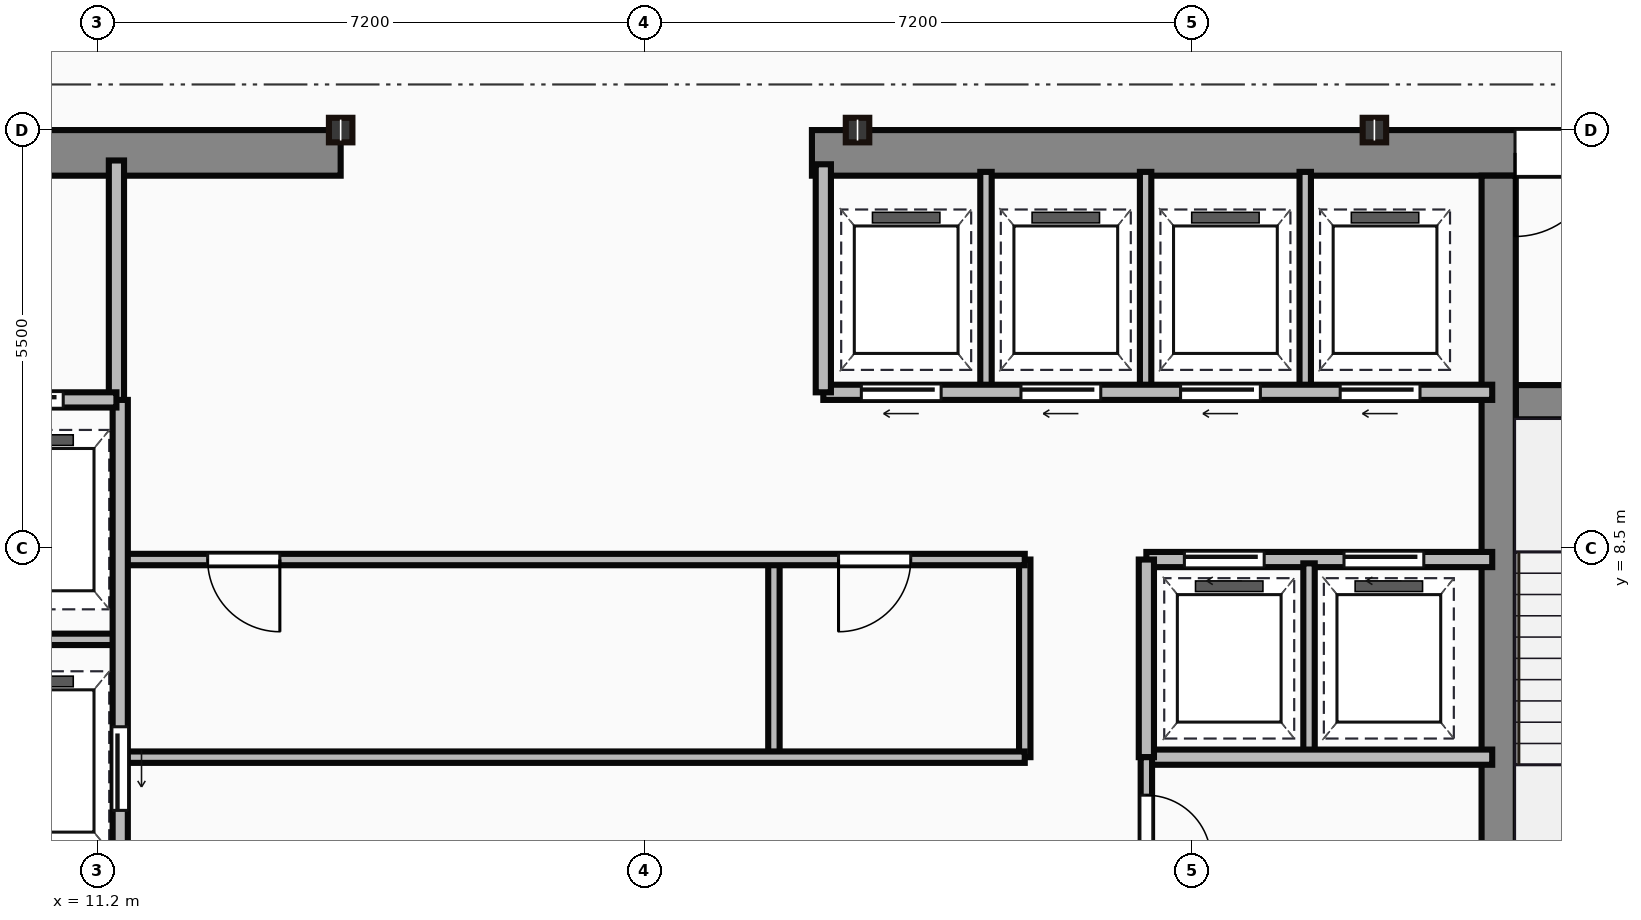
"""IFC4 building model, lengths in metres.
Left out: names, types, materials, properties, quantities, classifications, styles, units other than length and angle.
Written with IfcOpenShell. Run it as: python <this file> out.ifc"""

import sys

from ifc_helpers import new_model, si_unit, direction, frame, frame_2d, origin, origin_2d, place, context, subcontext, project, spatial, rectangle, i_section, extrude, source, transform, mapped, element, fill, save


model = new_model("IFC4")
c1 = context("Model", 3, precision=1e-05, world=origin(), true_north=direction((0.0, 1.0)))
c2 = subcontext(c1, "Body", "Model", "MODEL_VIEW")
j1 = project(units=[si_unit("LENGTHUNIT", "METRE"), si_unit("PLANEANGLEUNIT", "RADIAN")], contexts=[c1])
p1 = place(None, origin())
s1 = spatial("IfcSite", under=j1, at=p1, CompositionType="ELEMENT")
p2 = place(p1, origin())
s2 = spatial("IfcBuilding", under=s1, at=p2, CompositionType="ELEMENT")
p3 = place(p2, frame((0.0, 0.0, 225.1)))
s3 = spatial("IfcBuildingStorey", under=s2, at=p3, CompositionType="ELEMENT", Elevation=225.1)
m1 = source(origin(), c2, "Body", "SweptSolid", [
    extrude(rectangle(XDim=9.1, YDim=0.6, at=frame_2d((4.55, 0.0))), origin(), (0.0, 0.0, 1.0), 3.65),
])
p4 = place(p3, frame((5.3, 13.7, 0.0), z_axis=(0.0, 0.0, 1.0), x_axis=(1.0, 0.0, 0.0)))
e1 = element("IfcWall", 1, at=p4, inside=s3, PredefinedType="SHEAR", context=c2, shape_type="MappedRepresentation", body=[
    mapped(m1, transform((0.0, 0.0, 0.0))),
])
p5 = place(p4, frame((4.1, 0.0, 0.0)))
e2 = element("IfcOpeningElement", 2, at=p5, cuts=e1, PredefinedType="OPENING", context=c2, shape_type="SweptSolid", body=[
    extrude(rectangle(XDim=1.1, YDim=2.15, at=frame_2d((0.55, 1.075))), frame((0.0, 0.31, 0.0), z_axis=(0.0, -1.0, 0.0), x_axis=(1.0, 0.0, 0.0)), (0.0, 0.0, 1.0), 0.62),
])
m2 = source(origin(), c2, "Body", "SweptSolid", [
    extrude(rectangle(XDim=12.6, YDim=0.6, at=frame_2d((6.3, 0.0))), origin(), (0.0, 0.0, 1.0), 3.65),
])
p6 = place(p3, frame((20.6, 13.7, 0.0), z_axis=(0.0, 0.0, 1.0), x_axis=(1.0, 0.0, 0.0)))
e3 = element("IfcWall", 3, at=p6, inside=s3, PredefinedType="SHEAR", context=c2, shape_type="MappedRepresentation", body=[
    mapped(m2, transform((0.0, 0.0, 0.0))),
])
p7 = place(p6, frame((9.25, 0.0, 0.0)))
e4 = element("IfcOpeningElement", 4, at=p7, cuts=e3, PredefinedType="OPENING", context=c2, shape_type="SweptSolid", body=[
    extrude(rectangle(XDim=1.1, YDim=2.15, at=frame_2d((0.55, 1.075))), frame((0.0, 0.31, 0.0), z_axis=(0.0, -1.0, 0.0), x_axis=(1.0, 0.0, 0.0)), (0.0, 0.0, 1.0), 0.62),
])
m3 = source(origin(), c2, "Body", "SweptSolid", [
    extrude(rectangle(XDim=12.5, YDim=0.45, at=frame_2d((6.25, 0.0))), origin(), (0.0, 0.0, 1.0), 3.65),
])
p8 = place(p3, frame((29.635, 0.9, 0.0), z_axis=(0.0, 0.0, 1.0), x_axis=(0.0, 1.0, 0.0)))
e5 = element("IfcWall", 5, at=p8, inside=s3, PredefinedType="SHEAR", context=c2, shape_type="MappedRepresentation", body=[
    mapped(m3, transform((0.0, 0.0, 0.0))),
])
m4 = source(origin(), c2, "Body", "SweptSolid", [
    extrude(rectangle(XDim=3.39, YDim=0.45, at=frame_2d((1.695, 0.0))), origin(), (0.0, 0.0, 1.0), 3.65),
])
p9 = place(p3, frame((29.86, 10.42, 0.0), z_axis=(0.0, 0.0, 1.0), x_axis=(1.0, 0.0, 0.0)))
e6 = element("IfcWall", 6, at=p9, inside=s3, PredefinedType="SHEAR", context=c2, shape_type="MappedRepresentation", body=[
    mapped(m4, transform((0.0, 0.0, 0.0))),
])
p10 = place(p9, frame((1.1, 0.0, 0.0)))
e7 = element("IfcOpeningElement", 7, at=p10, cuts=e6, PredefinedType="OPENING", context=c2, shape_type="SweptSolid", body=[
    extrude(rectangle(XDim=1.1, YDim=2.15, at=frame_2d((0.55, 1.075))), frame((0.0, 0.235, 0.0), z_axis=(0.0, -1.0, 0.0), x_axis=(1.0, 0.0, 0.0)), (0.0, 0.0, 1.0), 0.47),
])
m5 = source(origin(), c2, "Body", "SweptSolid", [
    extrude(i_section(OverallWidth=0.309, OverallDepth=0.323, WebThickness=0.014, FlangeThickness=0.023, at=origin_2d()), origin(), (0.0, 0.0, 1.0), 3.65),
])
for number, where, z_axis, x_axis in (
    (8, (14.4, 14.0, 0.0), (0.0, 0.0, 1.0), (1.0, 0.0, 0.0)),
    (9, (21.2, 14.0, 0.0), (0.0, 0.0, 1.0), (1.0, 0.0, 0.0)),
    (10, (28.0, 14.0, 0.0), (0.0, 0.0, 1.0), (1.0, 0.0, 0.0)),
):
    element("IfcColumn", number, at=place(p3, frame(where, z_axis=z_axis, x_axis=x_axis)), inside=s3, PredefinedType="COLUMN", context=c2, shape_type="MappedRepresentation", body=[
        mapped(m5, transform((0.0, 0.0, 0.0))),
    ])
m6 = source(origin(), c2, "Body", "SweptSolid", [
    extrude(rectangle(XDim=3.18, YDim=0.2, at=frame_2d((1.59, 0.0))), origin(), (0.0, 0.0, 1.0), 3.4),
])
p11 = place(p3, frame((11.45, 10.42, 0.0), z_axis=(0.0, 0.0, 1.0), x_axis=(0.0, 1.0, 0.0)))
e11 = element("IfcWall", 11, at=p11, inside=s3, PredefinedType="PARTITIONING", context=c2, shape_type="MappedRepresentation", body=[
    mapped(m6, transform((0.0, 0.0, 0.0))),
])
m7 = source(origin(), c2, "Body", "SweptSolid", [
    extrude(rectangle(XDim=2.35, YDim=0.2, at=frame_2d((1.175, 0.0))), origin(), (0.0, 0.0, 1.0), 3.4),
])
p12 = place(p3, frame((9.1, 10.45, 0.0), z_axis=(0.0, 0.0, 1.0), x_axis=(1.0, 0.0, 0.0)))
e12 = element("IfcWall", 12, at=p12, inside=s3, PredefinedType="PARTITIONING", context=c2, shape_type="MappedRepresentation", body=[
    mapped(m7, transform((0.0, 0.0, 0.0))),
])
p13 = place(p12, frame((0.55, 0.0, 0.0)))
e13 = element("IfcOpeningElement", 13, at=p13, cuts=e12, PredefinedType="OPENING", context=c2, shape_type="SweptSolid", body=[
    extrude(rectangle(XDim=1.1, YDim=2.15, at=frame_2d((0.55, 1.075))), frame((0.0, 0.11, 0.0), z_axis=(0.0, -1.0, 0.0), x_axis=(1.0, 0.0, 0.0)), (0.0, 0.0, 1.0), 0.22),
])
m8 = source(origin(), c2, "Body", "SweptSolid", [
    extrude(rectangle(XDim=9.6, YDim=0.2, at=frame_2d((4.8, 0.0))), origin(), (0.0, 0.0, 1.0), 3.4),
])
p14 = place(p3, frame((11.5, 0.85, 0.0), z_axis=(0.0, 0.0, 1.0), x_axis=(0.0, 1.0, 0.0)))
e14 = element("IfcWall", 14, at=p14, inside=s3, PredefinedType="PARTITIONING", context=c2, shape_type="MappedRepresentation", body=[
    mapped(m8, transform((0.0, 0.0, 0.0))),
])
p15 = place(p14, frame((4.2, 0.0, 0.0)))
e15 = element("IfcOpeningElement", 15, at=p15, cuts=e14, PredefinedType="OPENING", context=c2, shape_type="SweptSolid", body=[
    extrude(rectangle(XDim=1.1, YDim=2.15, at=frame_2d((0.55, 1.075))), frame((0.0, 0.11, 0.0), z_axis=(0.0, -1.0, 0.0), x_axis=(1.0, 0.0, 0.0)), (0.0, 0.0, 1.0), 0.22),
])
p16 = place(p14, frame((0.9, 0.0, 0.0)))
e16 = element("IfcOpeningElement", 16, at=p16, cuts=e14, PredefinedType="OPENING", context=c2, shape_type="SweptSolid", body=[
    extrude(rectangle(XDim=1.2, YDim=2.15, at=frame_2d((0.6, 1.075))), frame((0.0, 0.11, 0.0), z_axis=(0.0, -1.0, 0.0), x_axis=(1.0, 0.0, 0.0)), (0.0, 0.0, 1.0), 0.22),
])
m9 = source(origin(), c2, "Body", "SweptSolid", [
    extrude(rectangle(XDim=2.4, YDim=0.15, at=frame_2d((1.2, 0.0))), origin(), (0.0, 0.0, 1.0), 3.4),
])
p17 = place(p3, frame((9.1, 7.3, 0.0), z_axis=(0.0, 0.0, 1.0), x_axis=(1.0, 0.0, 0.0)))
e17 = element("IfcWall", 17, at=p17, inside=s3, PredefinedType="PARTITIONING", context=c2, shape_type="MappedRepresentation", body=[
    mapped(m9, transform((0.0, 0.0, 0.0))),
])
m10 = source(origin(), c2, "Body", "SweptSolid", [
    extrude(rectangle(XDim=11.85, YDim=0.15, at=frame_2d((5.925, 0.0))), origin(), (0.0, 0.0, 1.0), 3.4),
])
p18 = place(p3, frame((11.55, 5.75, 0.0), z_axis=(0.0, 0.0, 1.0), x_axis=(1.0, 0.0, 0.0)))
e18 = element("IfcWall", 18, at=p18, inside=s3, PredefinedType="PARTITIONING", context=c2, shape_type="MappedRepresentation", body=[
    mapped(m10, transform((0.0, 0.0, 0.0))),
])
p19 = place(p3, frame((11.55, 8.35, 0.0), z_axis=(0.0, 0.0, 1.0), x_axis=(1.0, 0.0, 0.0)))
e19 = element("IfcWall", 19, at=p19, inside=s3, PredefinedType="PARTITIONING", context=c2, shape_type="MappedRepresentation", body=[
    mapped(m10, transform((0.0, 0.0, 0.0))),
])
p20 = place(p19, frame((1.1, 0.0, 0.0)))
e20 = element("IfcOpeningElement", 20, at=p20, cuts=e19, PredefinedType="OPENING", context=c2, shape_type="SweptSolid", body=[
    extrude(rectangle(XDim=0.95, YDim=2.15, at=frame_2d((0.475, 1.075))), frame((0.0, 0.085, 0.0), z_axis=(0.0, -1.0, 0.0), x_axis=(1.0, 0.0, 0.0)), (0.0, 0.0, 1.0), 0.17),
])
p21 = place(p19, frame((9.4, 0.0, 0.0)))
e21 = element("IfcOpeningElement", 21, at=p21, cuts=e19, PredefinedType="OPENING", context=c2, shape_type="SweptSolid", body=[
    extrude(rectangle(XDim=0.95, YDim=2.15, at=frame_2d((0.475, 1.075))), frame((0.0, 0.085, 0.0), z_axis=(0.0, -1.0, 0.0), x_axis=(1.0, 0.0, 0.0)), (0.0, 0.0, 1.0), 0.17),
])
m11 = source(origin(), c2, "Body", "SweptSolid", [
    extrude(rectangle(XDim=2.6, YDim=0.15, at=frame_2d((1.3, 0.0))), origin(), (0.0, 0.0, 1.0), 3.4),
])
p22 = place(p3, frame((23.4, 5.75, 0.0), z_axis=(0.0, 0.0, 1.0), x_axis=(0.0, 1.0, 0.0)))
e22 = element("IfcWall", 22, at=p22, inside=s3, PredefinedType="PARTITIONING", context=c2, shape_type="MappedRepresentation", body=[
    mapped(m11, transform((0.0, 0.0, 0.0))),
])
m12 = source(origin(), c2, "Body", "SweptSolid", [
    extrude(rectangle(XDim=2.5, YDim=0.15, at=frame_2d((1.25, 0.0))), origin(), (0.0, 0.0, 1.0), 3.4),
])
p23 = place(p3, frame((20.1, 5.8, 0.0), z_axis=(0.0, 0.0, 1.0), x_axis=(0.0, 1.0, 0.0)))
e23 = element("IfcWall", 23, at=p23, inside=s3, PredefinedType="PARTITIONING", context=c2, shape_type="MappedRepresentation", body=[
    mapped(m12, transform((0.0, 0.0, 0.0))),
])
m13 = source(origin(), c2, "Body", "SweptSolid", [
    extrude(rectangle(XDim=8.8, YDim=0.2, at=frame_2d((4.4, 0.0))), origin(), (0.0, 0.0, 1.0), 3.4),
])
p24 = place(p3, frame((20.75, 10.55, 0.0), z_axis=(0.0, 0.0, 1.0), x_axis=(1.0, 0.0, 0.0)))
e24 = element("IfcWall", 24, at=p24, inside=s3, PredefinedType="PARTITIONING", context=c2, shape_type="MappedRepresentation", body=[
    mapped(m13, transform((0.0, 0.0, 0.0))),
])
p25 = place(p24, frame((0.5, 0.0, 0.0)))
e25 = element("IfcOpeningElement", 25, at=p25, cuts=e24, PredefinedType="OPENING", context=c2, shape_type="SweptSolid", body=[
    extrude(rectangle(XDim=1.05, YDim=2.15, at=frame_2d((0.525, 1.075))), frame((0.0, 0.11, 0.0), z_axis=(0.0, -1.0, 0.0), x_axis=(1.0, 0.0, 0.0)), (0.0, 0.0, 1.0), 0.22),
])
p26 = place(p24, frame((2.6, 0.0, 0.0)))
e26 = element("IfcOpeningElement", 26, at=p26, cuts=e24, PredefinedType="OPENING", context=c2, shape_type="SweptSolid", body=[
    extrude(rectangle(XDim=1.05, YDim=2.15, at=frame_2d((0.525, 1.075))), frame((0.0, 0.11, 0.0), z_axis=(0.0, -1.0, 0.0), x_axis=(1.0, 0.0, 0.0)), (0.0, 0.0, 1.0), 0.22),
])
p27 = place(p24, frame((4.7, 0.0, 0.0)))
e27 = element("IfcOpeningElement", 27, at=p27, cuts=e24, PredefinedType="OPENING", context=c2, shape_type="SweptSolid", body=[
    extrude(rectangle(XDim=1.05, YDim=2.15, at=frame_2d((0.525, 1.075))), frame((0.0, 0.11, 0.0), z_axis=(0.0, -1.0, 0.0), x_axis=(1.0, 0.0, 0.0)), (0.0, 0.0, 1.0), 0.22),
])
p28 = place(p24, frame((6.8, 0.0, 0.0)))
e28 = element("IfcOpeningElement", 28, at=p28, cuts=e24, PredefinedType="OPENING", context=c2, shape_type="SweptSolid", body=[
    extrude(rectangle(XDim=1.05, YDim=2.15, at=frame_2d((0.525, 1.075))), frame((0.0, 0.11, 0.0), z_axis=(0.0, -1.0, 0.0), x_axis=(1.0, 0.0, 0.0)), (0.0, 0.0, 1.0), 0.22),
])
m14 = source(origin(), c2, "Body", "SweptSolid", [
    extrude(rectangle(XDim=3.0, YDim=0.2, at=frame_2d((1.5, 0.0))), origin(), (0.0, 0.0, 1.0), 3.4),
])
p29 = place(p3, frame((20.75, 10.55, 0.0), z_axis=(0.0, 0.0, 1.0), x_axis=(0.0, 1.0, 0.0)))
e29 = element("IfcWall", 29, at=p29, inside=s3, PredefinedType="PARTITIONING", context=c2, shape_type="MappedRepresentation", body=[
    mapped(m14, transform((0.0, 0.0, 0.0))),
])
m15 = source(origin(), c2, "Body", "SweptSolid", [
    extrude(rectangle(XDim=2.85, YDim=0.15, at=frame_2d((1.425, 0.0))), origin(), (0.0, 0.0, 1.0), 3.4),
])
for number, where, z_axis, x_axis in (
    (30, (22.89, 10.6, 0.0), (0.0, 0.0, 1.0), (0.0, 1.0, 0.0)),
    (31, (24.99, 10.6, 0.0), (0.0, 0.0, 1.0), (0.0, 1.0, 0.0)),
    (32, (27.09, 10.6, 0.0), (0.0, 0.0, 1.0), (0.0, 1.0, 0.0)),
):
    element("IfcWall", number, at=place(p3, frame(where, z_axis=z_axis, x_axis=x_axis)), inside=s3, PredefinedType="PARTITIONING", context=c2, shape_type="MappedRepresentation", body=[
        mapped(m15, transform((0.0, 0.0, 0.0))),
    ])
m16 = source(origin(), c2, "Body", "SweptSolid", [
    extrude(rectangle(XDim=4.55, YDim=0.2, at=frame_2d((2.275, 0.0))), origin(), (0.0, 0.0, 1.0), 3.4),
])
p30 = place(p3, frame((25.0, 8.35, 0.0), z_axis=(0.0, 0.0, 1.0), x_axis=(1.0, 0.0, 0.0)))
e33 = element("IfcWall", 33, at=p30, inside=s3, PredefinedType="PARTITIONING", context=c2, shape_type="MappedRepresentation", body=[
    mapped(m16, transform((0.0, 0.0, 0.0))),
])
p31 = place(p30, frame((0.5, 0.0, 0.0)))
e34 = element("IfcOpeningElement", 34, at=p31, cuts=e33, PredefinedType="OPENING", context=c2, shape_type="SweptSolid", body=[
    extrude(rectangle(XDim=1.05, YDim=2.15, at=frame_2d((0.525, 1.075))), frame((0.0, 0.11, 0.0), z_axis=(0.0, -1.0, 0.0), x_axis=(1.0, 0.0, 0.0)), (0.0, 0.0, 1.0), 0.22),
])
p32 = place(p30, frame((2.6, 0.0, 0.0)))
e35 = element("IfcOpeningElement", 35, at=p32, cuts=e33, PredefinedType="OPENING", context=c2, shape_type="SweptSolid", body=[
    extrude(rectangle(XDim=1.05, YDim=2.15, at=frame_2d((0.525, 1.075))), frame((0.0, 0.11, 0.0), z_axis=(0.0, -1.0, 0.0), x_axis=(1.0, 0.0, 0.0)), (0.0, 0.0, 1.0), 0.22),
])
p33 = place(p3, frame((25.0, 5.75, 0.0), z_axis=(0.0, 0.0, 1.0), x_axis=(1.0, 0.0, 0.0)))
e36 = element("IfcWall", 36, at=p33, inside=s3, PredefinedType="PARTITIONING", context=c2, shape_type="MappedRepresentation", body=[
    mapped(m16, transform((0.0, 0.0, 0.0))),
])
m17 = source(origin(), c2, "Body", "SweptSolid", [
    extrude(rectangle(XDim=2.6, YDim=0.2, at=frame_2d((1.3, 0.0))), origin(), (0.0, 0.0, 1.0), 3.4),
])
p34 = place(p3, frame((25.0, 5.75, 0.0), z_axis=(0.0, 0.0, 1.0), x_axis=(0.0, 1.0, 0.0)))
e37 = element("IfcWall", 37, at=p34, inside=s3, PredefinedType="PARTITIONING", context=c2, shape_type="MappedRepresentation", body=[
    mapped(m17, transform((0.0, 0.0, 0.0))),
])
p35 = place(p3, frame((27.14, 5.8, 0.0), z_axis=(0.0, 0.0, 1.0), x_axis=(0.0, 1.0, 0.0)))
e38 = element("IfcWall", 38, at=p35, inside=s3, PredefinedType="PARTITIONING", context=c2, shape_type="MappedRepresentation", body=[
    mapped(m12, transform((0.0, 0.0, 0.0))),
])
m18 = source(origin(), c2, "Body", "SweptSolid", [
    extrude(rectangle(XDim=4.9, YDim=0.15, at=frame_2d((2.45, 0.0))), origin(), (0.0, 0.0, 1.0), 3.4),
])
p36 = place(p3, frame((25.0, 0.85, 0.0), z_axis=(0.0, 0.0, 1.0), x_axis=(0.0, 1.0, 0.0)))
e39 = element("IfcWall", 39, at=p36, inside=s3, PredefinedType="PARTITIONING", context=c2, shape_type="MappedRepresentation", body=[
    mapped(m18, transform((0.0, 0.0, 0.0))),
])
p37 = place(p36, frame((1.85, 0.0, 0.0)))
e40 = element("IfcOpeningElement", 40, at=p37, cuts=e39, PredefinedType="OPENING", context=c2, shape_type="SweptSolid", body=[
    extrude(rectangle(XDim=0.95, YDim=2.15, at=frame_2d((0.475, 1.075))), frame((0.0, 0.085, 0.0), z_axis=(0.0, -1.0, 0.0), x_axis=(1.0, 0.0, 0.0)), (0.0, 0.0, 1.0), 0.17),
])
p38 = place(p36, frame((3.55, 0.0, 0.0)))
e41 = element("IfcOpeningElement", 41, at=p38, cuts=e39, PredefinedType="OPENING", context=c2, shape_type="SweptSolid", body=[
    extrude(rectangle(XDim=0.85, YDim=2.15, at=frame_2d((0.425, 1.075))), frame((0.0, 0.085, 0.0), z_axis=(0.0, -1.0, 0.0), x_axis=(1.0, 0.0, 0.0)), (0.0, 0.0, 1.0), 0.17),
])
m19 = source(origin(), c2, "Body", "SweptSolid", [
    extrude(rectangle(XDim=1.1, YDim=2.15, at=frame_2d((0.55, 1.075))), frame((0.0, 0.025, 0.0), z_axis=(0.0, -1.0, 0.0), x_axis=(1.0, 0.0, 0.0)), (0.0, 0.0, 1.0), 0.05),
])
p39 = place(p7, origin())
e42 = element("IfcDoor", 42, at=p39, inside=s3, OperationType="SINGLE_SWING_LEFT", PredefinedType="DOOR", context=c2, shape_type="MappedRepresentation", body=[
    mapped(m19, transform((0.0, 0.0, 0.0))),
])
fill(e4, e42)
p40 = place(p13, origin())
e43 = element("IfcDoor", 43, at=p40, inside=s3, OperationType="SLIDING_TO_LEFT", PredefinedType="DOOR", context=c2, shape_type="MappedRepresentation", body=[
    mapped(m19, transform((0.0, 0.0, 0.0))),
])
fill(e13, e43)
p41 = place(p15, frame((1.1, 0.0, 0.0), z_axis=(0.0, 0.0, 1.0), x_axis=(-1.0, 0.0, 0.0)))
e44 = element("IfcDoor", 44, at=p41, inside=s3, OperationType="SLIDING_TO_LEFT", PredefinedType="DOOR", context=c2, shape_type="MappedRepresentation", body=[
    mapped(m19, transform((0.0, 0.0, 0.0))),
])
fill(e15, e44)
m20 = source(origin(), c2, "Body", "SweptSolid", [
    extrude(rectangle(XDim=0.95, YDim=2.15, at=frame_2d((0.475, 1.075))), frame((0.0, 0.025, 0.0), z_axis=(0.0, -1.0, 0.0), x_axis=(1.0, 0.0, 0.0)), (0.0, 0.0, 1.0), 0.05),
])
p42 = place(p20, origin())
e45 = element("IfcDoor", 45, at=p42, inside=s3, OperationType="SINGLE_SWING_RIGHT", PredefinedType="DOOR", context=c2, shape_type="MappedRepresentation", body=[
    mapped(m20, transform((0.0, 0.0, 0.0))),
])
fill(e20, e45)
p43 = place(p21, origin())
e46 = element("IfcDoor", 46, at=p43, inside=s3, OperationType="SINGLE_SWING_LEFT", PredefinedType="DOOR", context=c2, shape_type="MappedRepresentation", body=[
    mapped(m20, transform((0.0, 0.0, 0.0))),
])
fill(e21, e46)
m21 = source(origin(), c2, "Body", "SweptSolid", [
    extrude(rectangle(XDim=1.05, YDim=2.15, at=frame_2d((0.525, 1.075))), frame((0.0, 0.025, 0.0), z_axis=(0.0, -1.0, 0.0), x_axis=(1.0, 0.0, 0.0)), (0.0, 0.0, 1.0), 0.05),
])
p44 = place(p25, frame((1.05, 0.0, 0.0), z_axis=(0.0, 0.0, 1.0), x_axis=(-1.0, 0.0, 0.0)))
e47 = element("IfcDoor", 47, at=p44, inside=s3, OperationType="SLIDING_TO_LEFT", PredefinedType="DOOR", context=c2, shape_type="MappedRepresentation", body=[
    mapped(m21, transform((0.0, 0.0, 0.0))),
])
fill(e25, e47)
p45 = place(p26, frame((1.05, 0.0, 0.0), z_axis=(0.0, 0.0, 1.0), x_axis=(-1.0, 0.0, 0.0)))
e48 = element("IfcDoor", 48, at=p45, inside=s3, OperationType="SLIDING_TO_LEFT", PredefinedType="DOOR", context=c2, shape_type="MappedRepresentation", body=[
    mapped(m21, transform((0.0, 0.0, 0.0))),
])
fill(e26, e48)
p46 = place(p27, frame((1.05, 0.0, 0.0), z_axis=(0.0, 0.0, 1.0), x_axis=(-1.0, 0.0, 0.0)))
e49 = element("IfcDoor", 49, at=p46, inside=s3, OperationType="SLIDING_TO_LEFT", PredefinedType="DOOR", context=c2, shape_type="MappedRepresentation", body=[
    mapped(m21, transform((0.0, 0.0, 0.0))),
])
fill(e27, e49)
p47 = place(p28, frame((1.05, 0.0, 0.0), z_axis=(0.0, 0.0, 1.0), x_axis=(-1.0, 0.0, 0.0)))
e50 = element("IfcDoor", 50, at=p47, inside=s3, OperationType="SLIDING_TO_LEFT", PredefinedType="DOOR", context=c2, shape_type="MappedRepresentation", body=[
    mapped(m21, transform((0.0, 0.0, 0.0))),
])
fill(e28, e50)
p48 = place(p31, origin())
e51 = element("IfcDoor", 51, at=p48, inside=s3, OperationType="SLIDING_TO_LEFT", PredefinedType="DOOR", context=c2, shape_type="MappedRepresentation", body=[
    mapped(m21, transform((0.0, 0.0, 0.0))),
])
fill(e34, e51)
p49 = place(p32, origin())
e52 = element("IfcDoor", 52, at=p49, inside=s3, OperationType="SLIDING_TO_LEFT", PredefinedType="DOOR", context=c2, shape_type="MappedRepresentation", body=[
    mapped(m21, transform((0.0, 0.0, 0.0))),
])
fill(e35, e52)
m22 = source(origin(), c2, "Body", "SweptSolid", [
    extrude(rectangle(XDim=0.85, YDim=2.15, at=frame_2d((0.425, 1.075))), frame((0.0, 0.025, 0.0), z_axis=(0.0, -1.0, 0.0), x_axis=(1.0, 0.0, 0.0)), (0.0, 0.0, 1.0), 0.05),
])
p50 = place(p38, origin())
e53 = element("IfcDoor", 53, at=p50, inside=s3, OperationType="SINGLE_SWING_LEFT", PredefinedType="DOOR", context=c2, shape_type="MappedRepresentation", body=[
    mapped(m22, transform((0.0, 0.0, 0.0))),
])
fill(e41, e53)
save(model, sys.argv[1])
